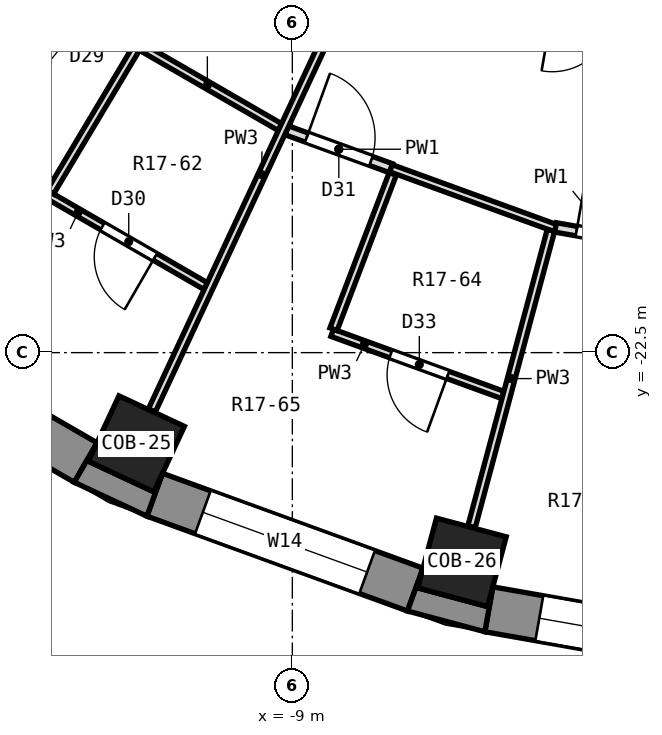
"""IFC4 building model, lengths in metres.
Left out: names, types, materials, properties, quantities, classifications, styles, units other than length and angle.
Written with IfcOpenShell. Run it as: python <this file> out.ifc"""

import sys

from ifc_helpers import new_model, si_unit, direction, frame, frame_2d, origin, origin_2d, place, context, subcontext, project, spatial, polyline, rectangle, outline, extrude, element, fill, save


model = new_model("IFC4")
c1 = context("Model", 3, precision=1e-05, world=origin(), true_north=direction((0.0, 1.0)))
c2 = subcontext(c1, "Body", "Model", "MODEL_VIEW")
j1 = project(units=[si_unit("LENGTHUNIT", "METRE"), si_unit("PLANEANGLEUNIT", "RADIAN")], contexts=[c1])
p1 = place(None, origin())
s1 = spatial("IfcSite", under=j1, at=p1, CompositionType="ELEMENT")
p2 = place(p1, origin())
s2 = spatial("IfcBuilding", under=s1, at=p2, CompositionType="ELEMENT")
p3 = place(p2, frame((0.0, 0.0, 91.9)))
s3 = spatial("IfcBuildingStorey", under=s2, at=p3, CompositionType="ELEMENT", Elevation=91.9)
for number, where, z_axis, x_axis in (
    (1, (-11.052, -23.7, 0.0), (0.0, 0.0, 1.0), (-0.423, -0.906, 0.0)),
    (2, (-6.768, -25.259, 0.0), (0.0, 0.0, 1.0), (-0.259, -0.966, 0.0)),
):
    element("IfcColumn", number, at=place(p3, frame(where, z_axis=z_axis, x_axis=x_axis)), inside=s3, PredefinedType="COLUMN", context=c2, shape_type="SweptSolid", body=[
        extrude(rectangle(XDim=0.95, YDim=0.95, at=origin_2d()), origin(), (0.0, 0.0, 1.0), 3.3),
    ])
p4 = place(p3, frame((-14.878, -22.122, 0.0), z_axis=(0.0, 0.0, 1.0), x_axis=(0.866051847062, -0.499954196102, 0.0)))
e3 = element("IfcWall", 3, at=p4, inside=s3, PredefinedType="SOLIDWALL", context=c2, shape_type="SweptSolid", body=[
    extrude(rectangle(XDim=3.648, YDim=0.6, at=frame_2d((1.824, 0.0))), origin(), (0.0, 0.0, 1.0), 2.8),
])
p5 = place(p4, frame((0.674, 0.0, 0.9)))
e4 = element("IfcOpeningElement", 4, at=p5, cuts=e3, PredefinedType="OPENING", context=c2, shape_type="SweptSolid", body=[
    extrude(rectangle(XDim=2.3, YDim=1.8, at=frame_2d((1.15, 0.9))), frame((0.0, 0.312, 0.0), z_axis=(0.0, -1.0, 0.0), x_axis=(1.0, 0.0, 0.0)), (0.0, 0.0, 1.0), 0.624),
])
p6 = place(p3, frame((-10.811, -24.369, 0.0), z_axis=(0.0, 0.0, 1.0), x_axis=(0.939703505393, -0.341990236633, 0.0)))
e5 = element("IfcWall", 5, at=p6, inside=s3, PredefinedType="SOLIDWALL", context=c2, shape_type="SweptSolid", body=[
    extrude(rectangle(XDim=3.648, YDim=0.6, at=frame_2d((1.824, 0.0))), origin(), (0.0, 0.0, 1.0), 2.8),
])
p7 = place(p6, frame((0.674, 0.0, 0.9)))
e6 = element("IfcOpeningElement", 6, at=p7, cuts=e5, PredefinedType="OPENING", context=c2, shape_type="SweptSolid", body=[
    extrude(rectangle(XDim=2.3, YDim=1.8, at=frame_2d((1.15, 0.9))), frame((0.0, 0.312, 0.0), z_axis=(0.0, -1.0, 0.0), x_axis=(1.0, 0.0, 0.0)), (0.0, 0.0, 1.0), 0.624),
])
p8 = place(p3, frame((-6.415, -25.876, 0.0), z_axis=(0.0, 0.0, 1.0), x_axis=(0.984803764455, -0.173670796382, 0.0)))
e7 = element("IfcWall", 7, at=p8, inside=s3, PredefinedType="SOLIDWALL", context=c2, shape_type="SweptSolid", body=[
    extrude(rectangle(XDim=3.648, YDim=0.6, at=frame_2d((1.824, 0.0))), origin(), (0.0, 0.0, 1.0), 2.8),
])
p9 = place(p8, frame((0.674, 0.0, 0.9)))
e8 = element("IfcOpeningElement", 8, at=p9, cuts=e7, PredefinedType="OPENING", context=c2, shape_type="SweptSolid", body=[
    extrude(rectangle(XDim=2.3, YDim=1.8, at=frame_2d((1.15, 0.9))), frame((0.0, 0.312, 0.0), z_axis=(0.0, -1.0, 0.0), x_axis=(1.0, 0.0, 0.0)), (0.0, 0.0, 1.0), 0.624),
])
p10 = place(p3, origin())
e9 = element("IfcWall", 9, at=p10, inside=s3, PredefinedType="SOLIDWALL", context=c2, shape_type="SweptSolid", body=[
    extrude(outline(polyline([(-10.913, -24.651), (-10.708, -24.087), (-10.822, -24.331), (-11.683, -23.93), (-11.569, -23.686), (-11.869, -24.206), (-10.913, -24.651)])), origin(), (0.0, 0.0, 1.0), 2.8),
])
p11 = place(p3, origin())
e10 = element("IfcWall", 10, at=p11, inside=s3, PredefinedType="SOLIDWALL", context=c2, shape_type="SweptSolid", body=[
    extrude(outline(polyline([(-7.486, -25.899), (-6.467, -26.172), (-6.363, -25.581), (-6.432, -25.841), (-7.35, -25.595), (-7.28, -25.335), (-7.486, -25.899)])), origin(), (0.0, 0.0, 1.0), 2.8),
])
p12 = place(p3, frame((-12.209, -20.43, 0.0), z_axis=(0.0, 0.0, 1.0), x_axis=(0.865989934965, -0.500061428766, 0.0)))
e11 = element("IfcWall", 11, at=p12, inside=s3, PredefinedType="PARTITIONING", context=c2, shape_type="SweptSolid", body=[
    extrude(rectangle(XDim=2.39, YDim=0.1, at=frame_2d((1.195, 0.0))), origin(), (0.0, 0.0, 1.0), 2.8),
])
p13 = place(p12, frame((0.82, 0.0, 0.0)))
e12 = element("IfcOpeningElement", 12, at=p13, cuts=e11, PredefinedType="OPENING", context=c2, shape_type="SweptSolid", body=[
    extrude(rectangle(XDim=0.8, YDim=2.1, at=frame_2d((0.4, 1.05))), frame((0.0, 0.062, 0.0), z_axis=(0.0, -1.0, 0.0), x_axis=(1.0, 0.0, 0.0)), (0.0, 0.0, 1.0), 0.124),
])
p14 = place(p3, frame((-11.072, -18.43, 0.0), z_axis=(0.0, 0.0, 1.0), x_axis=(0.865848017448, -0.500307116361, 0.0)))
e13 = element("IfcWall", 13, at=p14, inside=s3, PredefinedType="PARTITIONING", context=c2, shape_type="SweptSolid", body=[
    extrude(rectangle(XDim=2.205, YDim=0.1, at=frame_2d((1.102, 0.0))), origin(), (0.0, 0.0, 1.0), 2.8),
])
p15 = place(p3, frame((-8.476, -22.239, 0.0), z_axis=(0.0, 0.0, 1.0), x_axis=(0.939644231496, -0.342153062556, 0.0)))
e14 = element("IfcWall", 14, at=p15, inside=s3, PredefinedType="PARTITIONING", context=c2, shape_type="SweptSolid", body=[
    extrude(rectangle(XDim=2.39, YDim=0.1, at=frame_2d((1.195, 0.0))), origin(), (0.0, 0.0, 1.0), 2.8),
])
p16 = place(p15, frame((0.82, 0.0, 0.0)))
e15 = element("IfcOpeningElement", 15, at=p16, cuts=e14, PredefinedType="OPENING", context=c2, shape_type="SweptSolid", body=[
    extrude(rectangle(XDim=0.8, YDim=2.1, at=frame_2d((0.4, 1.05))), frame((0.0, 0.062, 0.0), z_axis=(0.0, -1.0, 0.0), x_axis=(1.0, 0.0, 0.0)), (0.0, 0.0, 1.0), 0.124),
])
p17 = place(p3, frame((-7.704, -20.073, 0.0), z_axis=(0.0, 0.0, 1.0), x_axis=(0.939734670151, -0.34190459154, 0.0)))
e16 = element("IfcWall", 16, at=p17, inside=s3, PredefinedType="PARTITIONING", context=c2, shape_type="SweptSolid", body=[
    extrude(rectangle(XDim=2.306, YDim=0.1, at=frame_2d((1.153, 0.0))), origin(), (0.0, 0.0, 1.0), 2.8),
])
p18 = place(p3, frame((-9.073, -19.575, 0.0), z_axis=(0.0, 0.0, 1.0), x_axis=(0.939788529673, -0.341756520778, 0.0)))
e17 = element("IfcWall", 17, at=p18, inside=s3, PredefinedType="PARTITIONING", context=c2, shape_type="SweptSolid", body=[
    extrude(rectangle(XDim=1.457, YDim=0.125, at=frame_2d((0.728, 0.0))), origin(), (0.0, 0.0, 1.0), 2.8),
])
p19 = place(p18, frame((0.278, 0.0, 0.0)))
e18 = element("IfcOpeningElement", 18, at=p19, cuts=e17, PredefinedType="OPENING", context=c2, shape_type="SweptSolid", body=[
    extrude(rectangle(XDim=0.9, YDim=2.1, at=frame_2d((0.45, 1.05))), frame((0.0, 0.074, 0.0), z_axis=(0.0, -1.0, 0.0), x_axis=(1.0, 0.0, 0.0)), (0.0, 0.0, 1.0), 0.149),
])
p20 = place(p3, frame((-5.536, -20.853, 0.0), z_axis=(0.0, 0.0, 1.0), x_axis=(0.984862774054, -0.173335848233, 0.0)))
e19 = element("IfcWall", 19, at=p20, inside=s3, PredefinedType="PARTITIONING", context=c2, shape_type="SweptSolid", body=[
    extrude(rectangle(XDim=1.456, YDim=0.125, at=frame_2d((0.728, 0.0))), origin(), (0.0, 0.0, 1.0), 2.8),
])
p21 = place(p20, frame((0.278, 0.0, 0.0)))
e20 = element("IfcOpeningElement", 20, at=p21, cuts=e19, PredefinedType="OPENING", context=c2, shape_type="SweptSolid", body=[
    extrude(rectangle(XDim=0.9, YDim=2.1, at=frame_2d((0.45, 1.05))), frame((0.0, 0.074, 0.0), z_axis=(0.0, -1.0, 0.0), x_axis=(1.0, 0.0, 0.0)), (0.0, 0.0, 1.0), 0.149),
])
p22 = place(p3, frame((-6.3, -17.878, 0.0), z_axis=(0.0, 0.0, 1.0), x_axis=(0.984813837489, -0.173613667348, 0.0)))
e21 = element("IfcWall", 21, at=p22, inside=s3, PredefinedType="PARTITIONING", context=c2, shape_type="SweptSolid", body=[
    extrude(rectangle(XDim=4.787, YDim=0.1, at=frame_2d((2.394, 0.0))), origin(), (0.0, 0.0, 1.0), 2.8),
])
p23 = place(p22, frame((0.729, 0.0, 0.0)))
e22 = element("IfcOpeningElement", 22, at=p23, cuts=e21, PredefinedType="OPENING", context=c2, shape_type="SweptSolid", body=[
    extrude(rectangle(XDim=0.8, YDim=2.1, at=frame_2d((0.4, 1.05))), frame((0.0, 0.062, 0.0), z_axis=(0.0, -1.0, 0.0), x_axis=(1.0, 0.0, 0.0)), (0.0, 0.0, 1.0), 0.124),
])
p24 = place(p3, frame((-12.183, -20.387, 0.0), z_axis=(0.0, 0.0, 1.0), x_axis=(0.512903306279, 0.85844638645, 0.0)))
e23 = element("IfcWall", 23, at=p24, inside=s3, PredefinedType="PARTITIONING", context=c2, shape_type="SweptSolid", body=[
    extrude(rectangle(XDim=2.188, YDim=0.1, at=frame_2d((1.094, 0.0))), origin(), (0.0, 0.0, 1.0), 2.8),
])
p25 = place(p3, frame((-10.848, -23.26, 0.0), z_axis=(0.0, 0.0, 1.0), x_axis=(0.422908898334, 0.906172204225, 0.0)))
e24 = element("IfcWall", 24, at=p25, inside=s3, PredefinedType="PARTITIONING", context=c2, shape_type="SweptSolid", body=[
    extrude(rectangle(XDim=6.844, YDim=0.1, at=frame_2d((3.422, 0.0))), origin(), (0.0, 0.0, 1.0), 2.8),
])
p26 = place(p3, frame((-8.458, -22.192, 0.0), z_axis=(0.0, 0.0, 1.0), x_axis=(0.356134598474, 0.93443466747, 0.0)))
e25 = element("IfcWall", 25, at=p26, inside=s3, PredefinedType="PARTITIONING", context=c2, shape_type="SweptSolid", body=[
    extrude(rectangle(XDim=2.187, YDim=0.1, at=frame_2d((1.093, 0.0))), origin(), (0.0, 0.0, 1.0), 2.8),
])
p27 = place(p3, frame((-6.642, -24.791, 0.0), z_axis=(0.0, 0.0, 1.0), x_axis=(0.258615129659, 0.965980442199, 0.0)))
e26 = element("IfcWall", 26, at=p27, inside=s3, PredefinedType="PARTITIONING", context=c2, shape_type="SweptSolid", body=[
    extrude(rectangle(XDim=4.036, YDim=0.1, at=frame_2d((2.018, 0.0))), origin(), (0.0, 0.0, 1.0), 2.8),
])
p28 = place(p7, origin())
e27 = element("IfcWindow", 27, at=p28, inside=s3, PartitioningType="SINGLE_PANEL", PredefinedType="WINDOW", context=c2, shape_type="SweptSolid", body=[
    extrude(rectangle(XDim=2.3, YDim=1.8, at=frame_2d((1.15, 0.9))), frame((0.0, 0.18, 0.0), z_axis=(0.0, -1.0, 0.0), x_axis=(1.0, 0.0, 0.0)), (0.0, 0.0, 1.0), 0.06),
])
fill(e6, e27)
p29 = place(p9, origin())
e28 = element("IfcWindow", 28, at=p29, inside=s3, PartitioningType="SINGLE_PANEL", PredefinedType="WINDOW", context=c2, shape_type="SweptSolid", body=[
    extrude(rectangle(XDim=2.3, YDim=1.8, at=frame_2d((1.15, 0.9))), frame((0.0, 0.18, 0.0), z_axis=(0.0, -1.0, 0.0), x_axis=(1.0, 0.0, 0.0)), (0.0, 0.0, 1.0), 0.06),
])
fill(e8, e28)
p30 = place(p13, frame((0.8, 0.0, 0.0), z_axis=(0.0, 0.0, 1.0), x_axis=(-1.0, 0.0, 0.0)))
e29 = element("IfcDoor", 29, at=p30, inside=s3, OperationType="SINGLE_SWING_LEFT", PredefinedType="DOOR", context=c2, shape_type="SweptSolid", body=[
    extrude(rectangle(XDim=0.8, YDim=2.1, at=frame_2d((0.4, 1.05))), frame((0.0, 0.025, 0.0), z_axis=(0.0, -1.0, 0.0), x_axis=(1.0, 0.0, 0.0)), (0.0, 0.0, 1.0), 0.05),
])
fill(e12, e29)
p31 = place(p19, origin())
e30 = element("IfcDoor", 30, at=p31, inside=s3, OperationType="SINGLE_SWING_LEFT", PredefinedType="DOOR", context=c2, shape_type="SweptSolid", body=[
    extrude(rectangle(XDim=0.9, YDim=2.1, at=frame_2d((0.45, 1.05))), frame((0.0, 0.025, 0.0), z_axis=(0.0, -1.0, 0.0), x_axis=(1.0, 0.0, 0.0)), (0.0, 0.0, 1.0), 0.05),
])
fill(e18, e30)
p32 = place(p16, frame((0.8, 0.0, 0.0), z_axis=(0.0, 0.0, 1.0), x_axis=(-1.0, 0.0, 0.0)))
e31 = element("IfcDoor", 31, at=p32, inside=s3, OperationType="SINGLE_SWING_LEFT", PredefinedType="DOOR", context=c2, shape_type="SweptSolid", body=[
    extrude(rectangle(XDim=0.8, YDim=2.1, at=frame_2d((0.4, 1.05))), frame((0.0, 0.025, 0.0), z_axis=(0.0, -1.0, 0.0), x_axis=(1.0, 0.0, 0.0)), (0.0, 0.0, 1.0), 0.05),
])
fill(e15, e31)
p33 = place(p21, origin())
e32 = element("IfcDoor", 32, at=p33, inside=s3, OperationType="SINGLE_SWING_LEFT", PredefinedType="DOOR", context=c2, shape_type="SweptSolid", body=[
    extrude(rectangle(XDim=0.9, YDim=2.1, at=frame_2d((0.45, 1.05))), frame((0.0, 0.025, 0.0), z_axis=(0.0, -1.0, 0.0), x_axis=(1.0, 0.0, 0.0)), (0.0, 0.0, 1.0), 0.05),
])
fill(e20, e32)
save(model, sys.argv[1])
